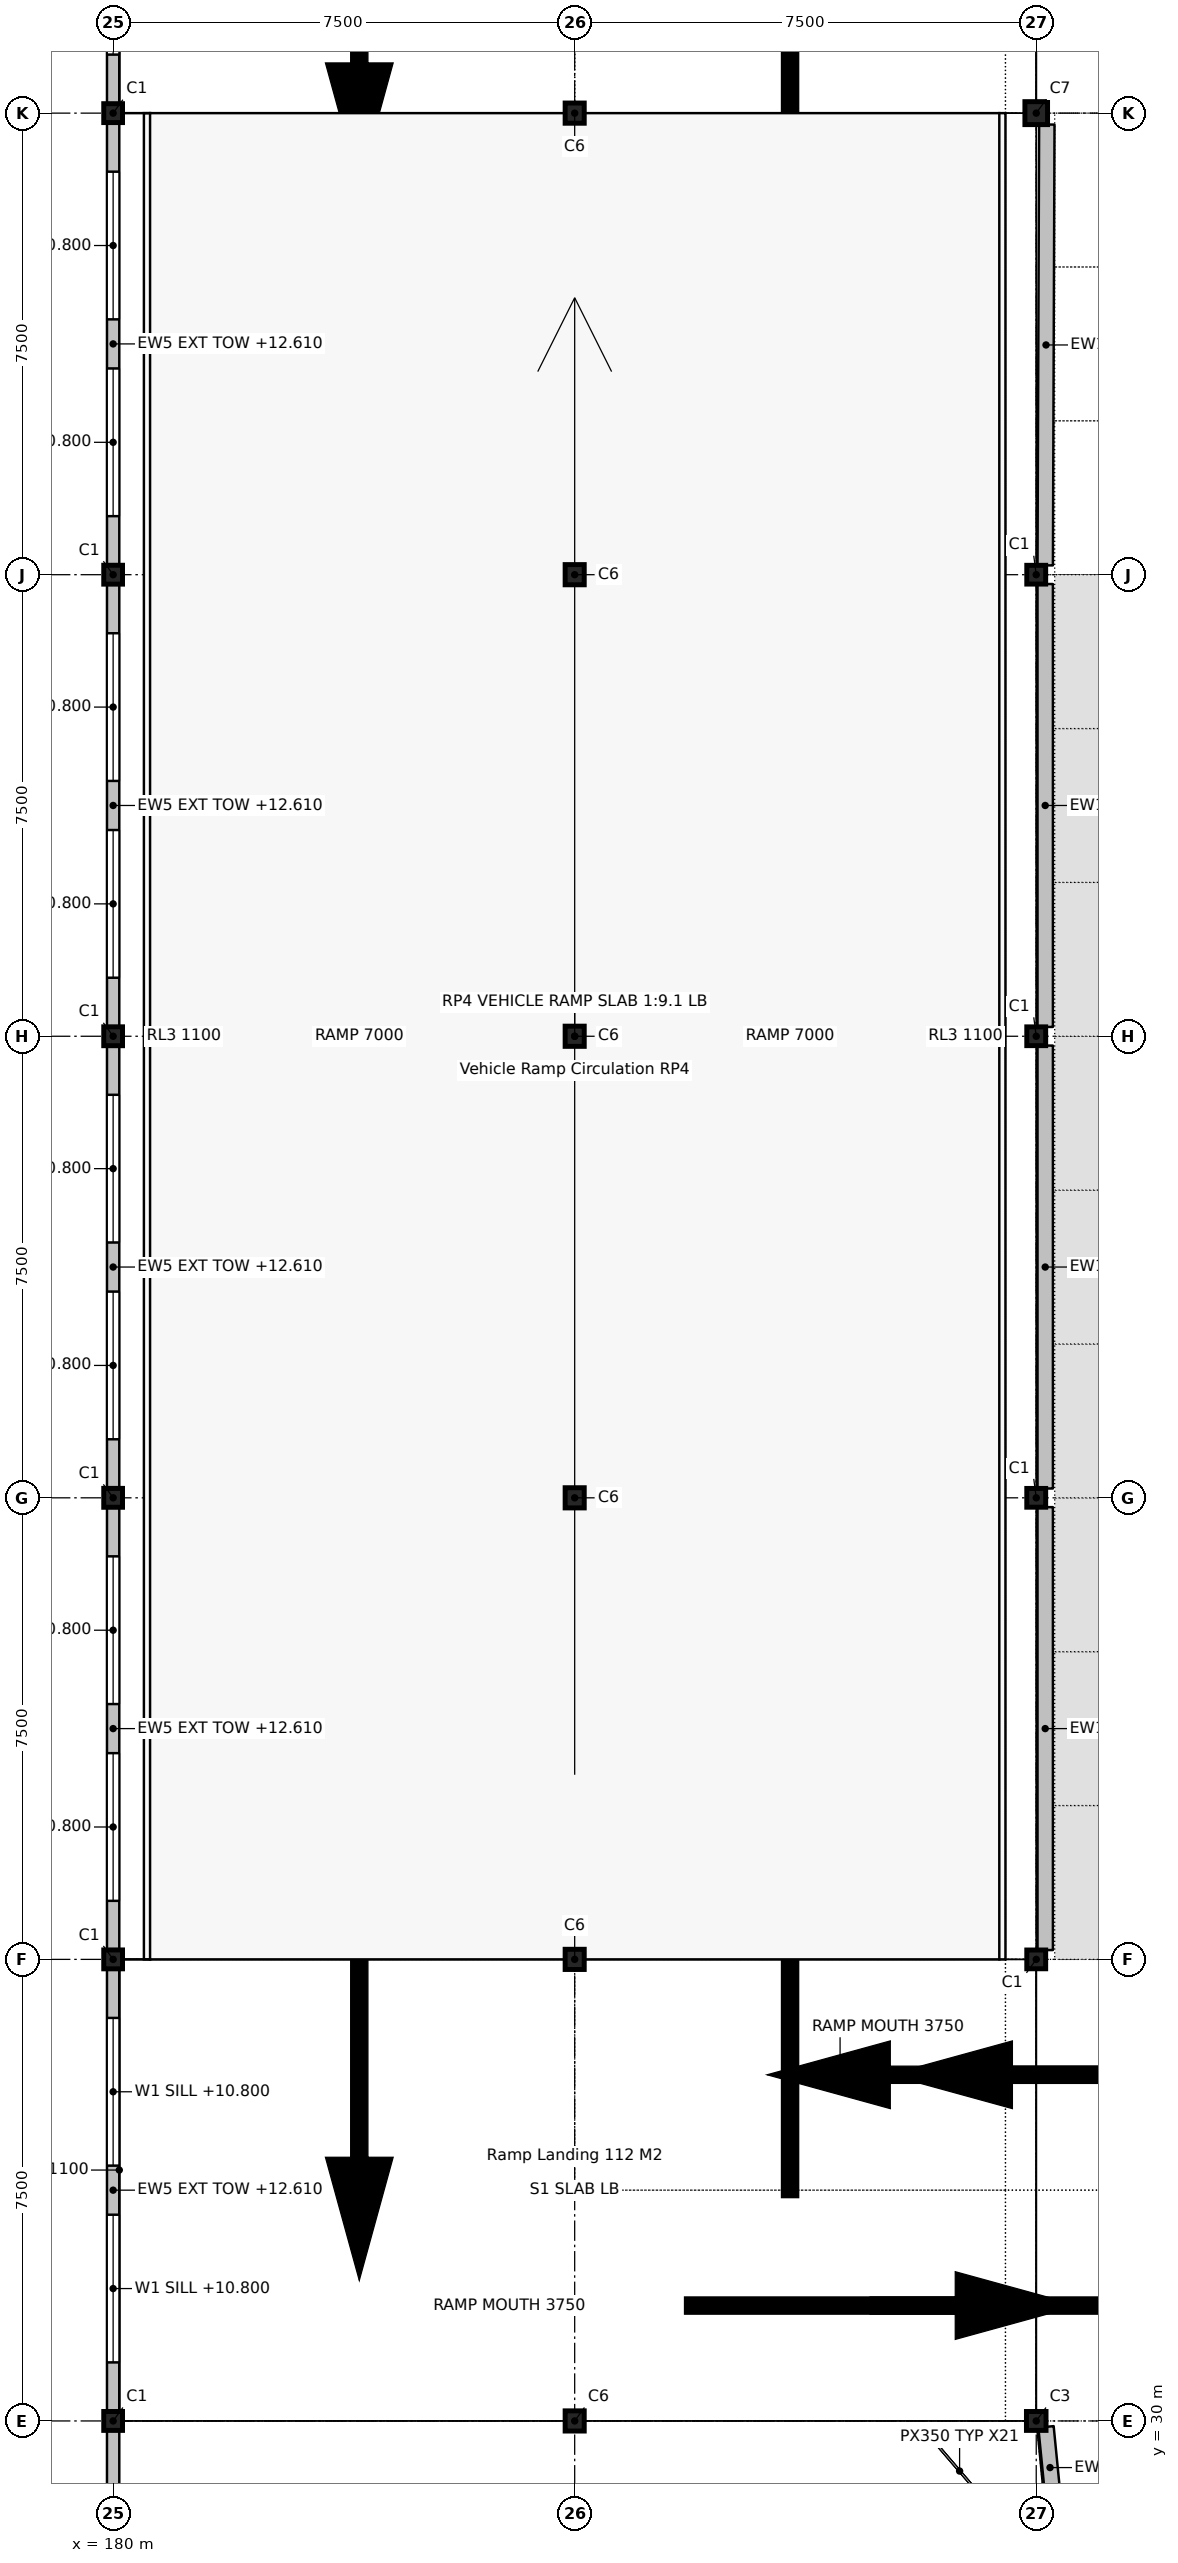
"""IFC4 building model, lengths in metres.
Left out: names, types, materials, properties, quantities, classifications, styles, units other than length and angle.
Written with IfcOpenShell. Run it as: python <this file> out.ifc"""

import sys

from ifc_helpers import new_model, si_unit, direction, frame, frame_2d, origin, origin_2d, place, context, subcontext, project, spatial, rectangle, i_section, extrude, element, fill, save


model = new_model("IFC4")
c1 = context("Model", 3, precision=1e-05, world=origin(), true_north=direction((0.0, 1.0)))
c2 = subcontext(c1, "Body", "Model", "MODEL_VIEW")
j1 = project(units=[si_unit("LENGTHUNIT", "METRE"), si_unit("PLANEANGLEUNIT", "RADIAN")], contexts=[c1])
p1 = place(None, origin())
s1 = spatial("IfcSite", under=j1, at=p1, CompositionType="ELEMENT")
p2 = place(p1, origin())
s2 = spatial("IfcBuilding", under=s1, at=p2, CompositionType="ELEMENT")
p3 = place(p2, frame((0.0, 0.0, 9.9)))
s3 = spatial("IfcBuildingStorey", under=s2, at=p3, CompositionType="ELEMENT", Elevation=9.9)
for number, where, z_axis, x_axis in (
    (1, (180.0, 30.0, 0.0), (0.0, 0.0, 1.0), (1.0, 0.0, 0.0)),
    (2, (180.0, 37.5, 0.0), (0.0, 0.0, 1.0), (1.0, 0.0, 0.0)),
    (3, (180.0, 45.0, 0.0), (0.0, 0.0, 1.0), (1.0, 0.0, 0.0)),
    (4, (180.0, 52.5, 0.0), (0.0, 0.0, 1.0), (1.0, 0.0, 0.0)),
    (5, (180.0, 60.0, 0.0), (0.0, 0.0, 1.0), (1.0, 0.0, 0.0)),
    (6, (180.0, 67.5, 0.0), (0.0, 0.0, 1.0), (1.0, 0.0, 0.0)),
):
    element("IfcColumn", number, at=place(p3, frame(where, z_axis=z_axis, x_axis=x_axis)), inside=s3, PredefinedType="COLUMN", context=c2, shape_type="SweptSolid", body=[
        extrude(i_section(OverallWidth=0.305, OverallDepth=0.307, WebThickness=0.01, FlangeThickness=0.015, FilletRadius=0.015, at=origin_2d()), origin(), (0.0, 0.0, 1.0), 3.3),
    ])
for number, where, z_axis, x_axis in (
    (7, (187.5, 30.0, 0.0), (0.0, 0.0, 1.0), (1.0, 0.0, 0.0)),
    (8, (187.5, 37.5, 0.0), (0.0, 0.0, 1.0), (1.0, 0.0, 0.0)),
    (9, (187.5, 45.0, 0.0), (0.0, 0.0, 1.0), (1.0, 0.0, 0.0)),
    (10, (187.5, 52.5, 0.0), (0.0, 0.0, 1.0), (1.0, 0.0, 0.0)),
    (11, (187.5, 60.0, 0.0), (0.0, 0.0, 1.0), (1.0, 0.0, 0.0)),
    (12, (187.5, 67.5, 0.0), (0.0, 0.0, 1.0), (1.0, 0.0, 0.0)),
):
    element("IfcColumn", number, at=place(p3, frame(where, z_axis=z_axis, x_axis=x_axis)), inside=s3, PredefinedType="COLUMN", context=c2, shape_type="SweptSolid", body=[
        extrude(i_section(OverallWidth=0.31, OverallDepth=0.328, WebThickness=0.015, FlangeThickness=0.025, FilletRadius=0.015, at=origin_2d()), origin(), (0.0, 0.0, 1.0), 3.3),
    ])
p4 = place(p3, frame((195.0, 67.5, 0.0), z_axis=(0.0, 0.0, 1.0), x_axis=(0.0, 1.0, 0.0)))
e13 = element("IfcColumn", 13, at=p4, inside=s3, PredefinedType="COLUMN", context=c2, shape_type="SweptSolid", body=[
    extrude(i_section(OverallWidth=0.373, OverallDepth=0.368, WebThickness=0.015, FlangeThickness=0.024, FilletRadius=0.015, at=origin_2d()), origin(), (0.0, 0.0, 1.0), 3.3),
])
for number, where, z_axis, x_axis in (
    (14, (195.0, 60.0, 0.0), (0.0, 0.0, 1.0), (0.0, 1.0, 0.0)),
    (15, (195.0, 52.5, 0.0), (0.0, 0.0, 1.0), (0.0, 1.0, 0.0)),
    (16, (195.0, 45.0, 0.0), (0.0, 0.0, 1.0), (0.0, 1.0, 0.0)),
    (17, (195.0, 37.5, 0.0), (0.0, 0.0, 1.0), (0.0, 1.0, 0.0)),
):
    element("IfcColumn", number, at=place(p3, frame(where, z_axis=z_axis, x_axis=x_axis)), inside=s3, PredefinedType="COLUMN", context=c2, shape_type="SweptSolid", body=[
        extrude(i_section(OverallWidth=0.305, OverallDepth=0.307, WebThickness=0.01, FlangeThickness=0.015, FilletRadius=0.015, at=origin_2d()), origin(), (0.0, 0.0, 1.0), 3.3),
    ])
p5 = place(p3, frame((195.0, 30.0, 0.0), z_axis=(0.0, 0.0, 1.0), x_axis=(0.0, 1.0, 0.0)))
e18 = element("IfcColumn", 18, at=p5, inside=s3, PredefinedType="COLUMN", context=c2, shape_type="SweptSolid", body=[
    extrude(i_section(OverallWidth=0.307, OverallDepth=0.318, WebThickness=0.013, FlangeThickness=0.021, FilletRadius=0.015, at=origin_2d()), origin(), (0.0, 0.0, 1.0), 3.3),
])
p6 = place(p3, frame((195.172, 67.314, 0.0), z_axis=(0.0, 0.0, 1.0), x_axis=(-0.003681082119, -0.999993224794, 0.0)))
e19 = element("IfcWall", 19, at=p6, inside=s3, PredefinedType="SOLIDWALL", context=c2, shape_type="SweptSolid", body=[
    extrude(rectangle(XDim=7.163, YDim=0.25, at=frame_2d((3.582, 0.0))), origin(), (0.0, 0.0, 1.0), 1.1),
])
for number, where, z_axis, x_axis in (
    (20, (195.146, 59.848, 0.0), (0.0, 0.0, 1.0), (0.0, -1.0, 0.0)),
    (21, (195.146, 52.348, 0.0), (0.0, 0.0, 1.0), (0.0, -1.0, 0.0)),
    (22, (195.146, 44.848, 0.0), (0.0, 0.0, 1.0), (0.0, -1.0, 0.0)),
):
    element("IfcWall", number, at=place(p3, frame(where, z_axis=z_axis, x_axis=x_axis)), inside=s3, PredefinedType="SOLIDWALL", context=c2, shape_type="SweptSolid", body=[
        extrude(rectangle(XDim=7.197, YDim=0.25, at=frame_2d((3.598, 0.0))), origin(), (0.0, 0.0, 1.0), 1.1),
    ])
p7 = place(p3, frame((195.159, 29.904, 0.0), z_axis=(0.0, 0.0, 1.0), x_axis=(0.098067173263, -0.995179797588, 0.0)))
e23 = element("IfcWall", 23, at=p7, inside=s3, PredefinedType="SOLIDWALL", context=c2, shape_type="SweptSolid", body=[
    extrude(rectangle(XDim=1.329, YDim=0.25, at=frame_2d((0.665, 0.0))), origin(), (0.0, 0.0, 1.0), 1.1),
])
p8 = place(p3, frame((180.0, 22.654, 0.0), z_axis=(0.0, 0.0, 1.0), x_axis=(0.0, 1.0, 0.0)))
e24 = element("IfcWall", 24, at=p8, inside=s3, PredefinedType="SOLIDWALL", context=c2, shape_type="SweptSolid", body=[
    extrude(rectangle(XDim=7.193, YDim=0.2, at=frame_2d((3.596, 0.0))), origin(), (0.0, 0.0, 1.0), 2.71),
])
p9 = place(p8, frame((1.098, 0.0, 1.1)))
e25 = element("IfcOpeningElement", 25, at=p9, cuts=e24, PredefinedType="OPENING", context=c2, shape_type="SweptSolid", body=[
    extrude(rectangle(XDim=1.8, YDim=1.4, at=frame_2d((0.9, 0.7))), frame((0.0, 0.11, 0.0), z_axis=(0.0, -1.0, 0.0), x_axis=(1.0, 0.0, 0.0)), (0.0, 0.0, 1.0), 0.22),
])
p10 = place(p8, frame((4.295, 0.0, 1.1)))
e26 = element("IfcOpeningElement", 26, at=p10, cuts=e24, PredefinedType="OPENING", context=c2, shape_type="SweptSolid", body=[
    extrude(rectangle(XDim=1.8, YDim=1.4, at=frame_2d((0.9, 0.7))), frame((0.0, 0.11, 0.0), z_axis=(0.0, -1.0, 0.0), x_axis=(1.0, 0.0, 0.0)), (0.0, 0.0, 1.0), 0.22),
])
p11 = place(p3, frame((180.0, 30.154, 0.0), z_axis=(0.0, 0.0, 1.0), x_axis=(0.0, 1.0, 0.0)))
e27 = element("IfcWall", 27, at=p11, inside=s3, PredefinedType="SOLIDWALL", context=c2, shape_type="SweptSolid", body=[
    extrude(rectangle(XDim=7.193, YDim=0.2, at=frame_2d((3.596, 0.0))), origin(), (0.0, 0.0, 1.0), 2.71),
])
p12 = place(p11, frame((0.798, 0.0, 0.9)))
e28 = element("IfcOpeningElement", 28, at=p12, cuts=e27, PredefinedType="OPENING", context=c2, shape_type="SweptSolid", body=[
    extrude(rectangle(XDim=2.4, YDim=1.5, at=frame_2d((1.2, 0.75))), frame((0.0, 0.11, 0.0), z_axis=(0.0, -1.0, 0.0), x_axis=(1.0, 0.0, 0.0)), (0.0, 0.0, 1.0), 0.22),
])
p13 = place(p11, frame((3.995, 0.0, 0.9)))
e29 = element("IfcOpeningElement", 29, at=p13, cuts=e27, PredefinedType="OPENING", context=c2, shape_type="SweptSolid", body=[
    extrude(rectangle(XDim=2.4, YDim=1.5, at=frame_2d((1.2, 0.75))), frame((0.0, 0.11, 0.0), z_axis=(0.0, -1.0, 0.0), x_axis=(1.0, 0.0, 0.0)), (0.0, 0.0, 1.0), 0.22),
])
p14 = place(p3, frame((180.0, 37.654, 0.0), z_axis=(0.0, 0.0, 1.0), x_axis=(0.0, 1.0, 0.0)))
e30 = element("IfcWall", 30, at=p14, inside=s3, PredefinedType="SOLIDWALL", context=c2, shape_type="SweptSolid", body=[
    extrude(rectangle(XDim=7.193, YDim=0.2, at=frame_2d((3.596, 0.0))), origin(), (0.0, 0.0, 1.0), 2.71),
])
p15 = place(p14, frame((0.798, 0.0, 0.9)))
e31 = element("IfcOpeningElement", 31, at=p15, cuts=e30, PredefinedType="OPENING", context=c2, shape_type="SweptSolid", body=[
    extrude(rectangle(XDim=2.4, YDim=1.5, at=frame_2d((1.2, 0.75))), frame((0.0, 0.11, 0.0), z_axis=(0.0, -1.0, 0.0), x_axis=(1.0, 0.0, 0.0)), (0.0, 0.0, 1.0), 0.22),
])
p16 = place(p14, frame((3.995, 0.0, 0.9)))
e32 = element("IfcOpeningElement", 32, at=p16, cuts=e30, PredefinedType="OPENING", context=c2, shape_type="SweptSolid", body=[
    extrude(rectangle(XDim=2.4, YDim=1.5, at=frame_2d((1.2, 0.75))), frame((0.0, 0.11, 0.0), z_axis=(0.0, -1.0, 0.0), x_axis=(1.0, 0.0, 0.0)), (0.0, 0.0, 1.0), 0.22),
])
p17 = place(p3, frame((180.0, 45.154, 0.0), z_axis=(0.0, 0.0, 1.0), x_axis=(0.0, 1.0, 0.0)))
e33 = element("IfcWall", 33, at=p17, inside=s3, PredefinedType="SOLIDWALL", context=c2, shape_type="SweptSolid", body=[
    extrude(rectangle(XDim=7.193, YDim=0.2, at=frame_2d((3.596, 0.0))), origin(), (0.0, 0.0, 1.0), 2.71),
])
p18 = place(p17, frame((0.798, 0.0, 0.9)))
e34 = element("IfcOpeningElement", 34, at=p18, cuts=e33, PredefinedType="OPENING", context=c2, shape_type="SweptSolid", body=[
    extrude(rectangle(XDim=2.4, YDim=1.5, at=frame_2d((1.2, 0.75))), frame((0.0, 0.11, 0.0), z_axis=(0.0, -1.0, 0.0), x_axis=(1.0, 0.0, 0.0)), (0.0, 0.0, 1.0), 0.22),
])
p19 = place(p17, frame((3.995, 0.0, 0.9)))
e35 = element("IfcOpeningElement", 35, at=p19, cuts=e33, PredefinedType="OPENING", context=c2, shape_type="SweptSolid", body=[
    extrude(rectangle(XDim=2.4, YDim=1.5, at=frame_2d((1.2, 0.75))), frame((0.0, 0.11, 0.0), z_axis=(0.0, -1.0, 0.0), x_axis=(1.0, 0.0, 0.0)), (0.0, 0.0, 1.0), 0.22),
])
p20 = place(p3, frame((180.0, 52.654, 0.0), z_axis=(0.0, 0.0, 1.0), x_axis=(0.0, 1.0, 0.0)))
e36 = element("IfcWall", 36, at=p20, inside=s3, PredefinedType="SOLIDWALL", context=c2, shape_type="SweptSolid", body=[
    extrude(rectangle(XDim=7.193, YDim=0.2, at=frame_2d((3.596, 0.0))), origin(), (0.0, 0.0, 1.0), 2.71),
])
p21 = place(p20, frame((0.798, 0.0, 0.9)))
e37 = element("IfcOpeningElement", 37, at=p21, cuts=e36, PredefinedType="OPENING", context=c2, shape_type="SweptSolid", body=[
    extrude(rectangle(XDim=2.4, YDim=1.5, at=frame_2d((1.2, 0.75))), frame((0.0, 0.11, 0.0), z_axis=(0.0, -1.0, 0.0), x_axis=(1.0, 0.0, 0.0)), (0.0, 0.0, 1.0), 0.22),
])
p22 = place(p20, frame((3.995, 0.0, 0.9)))
e38 = element("IfcOpeningElement", 38, at=p22, cuts=e36, PredefinedType="OPENING", context=c2, shape_type="SweptSolid", body=[
    extrude(rectangle(XDim=2.4, YDim=1.5, at=frame_2d((1.2, 0.75))), frame((0.0, 0.11, 0.0), z_axis=(0.0, -1.0, 0.0), x_axis=(1.0, 0.0, 0.0)), (0.0, 0.0, 1.0), 0.22),
])
p23 = place(p3, frame((180.0, 60.154, 0.0), z_axis=(0.0, 0.0, 1.0), x_axis=(0.0, 1.0, 0.0)))
e39 = element("IfcWall", 39, at=p23, inside=s3, PredefinedType="SOLIDWALL", context=c2, shape_type="SweptSolid", body=[
    extrude(rectangle(XDim=7.193, YDim=0.2, at=frame_2d((3.596, 0.0))), origin(), (0.0, 0.0, 1.0), 2.71),
])
p24 = place(p23, frame((0.798, 0.0, 0.9)))
e40 = element("IfcOpeningElement", 40, at=p24, cuts=e39, PredefinedType="OPENING", context=c2, shape_type="SweptSolid", body=[
    extrude(rectangle(XDim=2.4, YDim=1.5, at=frame_2d((1.2, 0.75))), frame((0.0, 0.11, 0.0), z_axis=(0.0, -1.0, 0.0), x_axis=(1.0, 0.0, 0.0)), (0.0, 0.0, 1.0), 0.22),
])
p25 = place(p23, frame((3.995, 0.0, 0.9)))
e41 = element("IfcOpeningElement", 41, at=p25, cuts=e39, PredefinedType="OPENING", context=c2, shape_type="SweptSolid", body=[
    extrude(rectangle(XDim=2.4, YDim=1.5, at=frame_2d((1.2, 0.75))), frame((0.0, 0.11, 0.0), z_axis=(0.0, -1.0, 0.0), x_axis=(1.0, 0.0, 0.0)), (0.0, 0.0, 1.0), 0.22),
])
p26 = place(p3, frame((180.0, 67.654, 0.0), z_axis=(0.0, 0.0, 1.0), x_axis=(0.0, 1.0, 0.0)))
e42 = element("IfcWall", 42, at=p26, inside=s3, PredefinedType="SOLIDWALL", context=c2, shape_type="SweptSolid", body=[
    extrude(rectangle(XDim=7.193, YDim=0.2, at=frame_2d((3.596, 0.0))), origin(), (0.0, 0.0, 1.0), 2.754),
])
p27 = place(p26, frame((0.798, 0.0, 0.9)))
e43 = element("IfcOpeningElement", 43, at=p27, cuts=e42, PredefinedType="OPENING", context=c2, shape_type="SweptSolid", body=[
    extrude(rectangle(XDim=2.4, YDim=1.5, at=frame_2d((1.2, 0.75))), frame((0.0, 0.11, 0.0), z_axis=(0.0, -1.0, 0.0), x_axis=(1.0, 0.0, 0.0)), (0.0, 0.0, 1.0), 0.22),
])
p28 = place(p26, frame((3.995, 0.0, 0.9)))
e44 = element("IfcOpeningElement", 44, at=p28, cuts=e42, PredefinedType="OPENING", context=c2, shape_type="SweptSolid", body=[
    extrude(rectangle(XDim=2.4, YDim=1.5, at=frame_2d((1.2, 0.75))), frame((0.0, 0.11, 0.0), z_axis=(0.0, -1.0, 0.0), x_axis=(1.0, 0.0, 0.0)), (0.0, 0.0, 1.0), 0.22),
])
p29 = place(p12, origin())
e45 = element("IfcWindow", 45, at=p29, inside=s3, PartitioningType="DOUBLE_PANEL_VERTICAL", PredefinedType="WINDOW", context=c2, shape_type="SweptSolid", body=[
    extrude(rectangle(XDim=2.4, YDim=1.5, at=frame_2d((1.2, 0.75))), frame((0.0, 0.03, 0.0), z_axis=(0.0, -1.0, 0.0), x_axis=(1.0, 0.0, 0.0)), (0.0, 0.0, 1.0), 0.06),
])
fill(e28, e45)
p30 = place(p13, origin())
e46 = element("IfcWindow", 46, at=p30, inside=s3, PartitioningType="DOUBLE_PANEL_VERTICAL", PredefinedType="WINDOW", context=c2, shape_type="SweptSolid", body=[
    extrude(rectangle(XDim=2.4, YDim=1.5, at=frame_2d((1.2, 0.75))), frame((0.0, 0.03, 0.0), z_axis=(0.0, -1.0, 0.0), x_axis=(1.0, 0.0, 0.0)), (0.0, 0.0, 1.0), 0.06),
])
fill(e29, e46)
p31 = place(p15, origin())
e47 = element("IfcWindow", 47, at=p31, inside=s3, PartitioningType="DOUBLE_PANEL_VERTICAL", PredefinedType="WINDOW", context=c2, shape_type="SweptSolid", body=[
    extrude(rectangle(XDim=2.4, YDim=1.5, at=frame_2d((1.2, 0.75))), frame((0.0, 0.03, 0.0), z_axis=(0.0, -1.0, 0.0), x_axis=(1.0, 0.0, 0.0)), (0.0, 0.0, 1.0), 0.06),
])
fill(e31, e47)
p32 = place(p16, origin())
e48 = element("IfcWindow", 48, at=p32, inside=s3, PartitioningType="DOUBLE_PANEL_VERTICAL", PredefinedType="WINDOW", context=c2, shape_type="SweptSolid", body=[
    extrude(rectangle(XDim=2.4, YDim=1.5, at=frame_2d((1.2, 0.75))), frame((0.0, 0.03, 0.0), z_axis=(0.0, -1.0, 0.0), x_axis=(1.0, 0.0, 0.0)), (0.0, 0.0, 1.0), 0.06),
])
fill(e32, e48)
p33 = place(p18, origin())
e49 = element("IfcWindow", 49, at=p33, inside=s3, PartitioningType="DOUBLE_PANEL_VERTICAL", PredefinedType="WINDOW", context=c2, shape_type="SweptSolid", body=[
    extrude(rectangle(XDim=2.4, YDim=1.5, at=frame_2d((1.2, 0.75))), frame((0.0, 0.03, 0.0), z_axis=(0.0, -1.0, 0.0), x_axis=(1.0, 0.0, 0.0)), (0.0, 0.0, 1.0), 0.06),
])
fill(e34, e49)
p34 = place(p19, origin())
e50 = element("IfcWindow", 50, at=p34, inside=s3, PartitioningType="DOUBLE_PANEL_VERTICAL", PredefinedType="WINDOW", context=c2, shape_type="SweptSolid", body=[
    extrude(rectangle(XDim=2.4, YDim=1.5, at=frame_2d((1.2, 0.75))), frame((0.0, 0.03, 0.0), z_axis=(0.0, -1.0, 0.0), x_axis=(1.0, 0.0, 0.0)), (0.0, 0.0, 1.0), 0.06),
])
fill(e35, e50)
p35 = place(p21, origin())
e51 = element("IfcWindow", 51, at=p35, inside=s3, PartitioningType="DOUBLE_PANEL_VERTICAL", PredefinedType="WINDOW", context=c2, shape_type="SweptSolid", body=[
    extrude(rectangle(XDim=2.4, YDim=1.5, at=frame_2d((1.2, 0.75))), frame((0.0, 0.03, 0.0), z_axis=(0.0, -1.0, 0.0), x_axis=(1.0, 0.0, 0.0)), (0.0, 0.0, 1.0), 0.06),
])
fill(e37, e51)
p36 = place(p22, origin())
e52 = element("IfcWindow", 52, at=p36, inside=s3, PartitioningType="DOUBLE_PANEL_VERTICAL", PredefinedType="WINDOW", context=c2, shape_type="SweptSolid", body=[
    extrude(rectangle(XDim=2.4, YDim=1.5, at=frame_2d((1.2, 0.75))), frame((0.0, 0.03, 0.0), z_axis=(0.0, -1.0, 0.0), x_axis=(1.0, 0.0, 0.0)), (0.0, 0.0, 1.0), 0.06),
])
fill(e38, e52)
p37 = place(p24, origin())
e53 = element("IfcWindow", 53, at=p37, inside=s3, PartitioningType="DOUBLE_PANEL_VERTICAL", PredefinedType="WINDOW", context=c2, shape_type="SweptSolid", body=[
    extrude(rectangle(XDim=2.4, YDim=1.5, at=frame_2d((1.2, 0.75))), frame((0.0, 0.03, 0.0), z_axis=(0.0, -1.0, 0.0), x_axis=(1.0, 0.0, 0.0)), (0.0, 0.0, 1.0), 0.06),
])
fill(e40, e53)
p38 = place(p25, origin())
e54 = element("IfcWindow", 54, at=p38, inside=s3, PartitioningType="DOUBLE_PANEL_VERTICAL", PredefinedType="WINDOW", context=c2, shape_type="SweptSolid", body=[
    extrude(rectangle(XDim=2.4, YDim=1.5, at=frame_2d((1.2, 0.75))), frame((0.0, 0.03, 0.0), z_axis=(0.0, -1.0, 0.0), x_axis=(1.0, 0.0, 0.0)), (0.0, 0.0, 1.0), 0.06),
])
fill(e41, e54)
p39 = place(p27, origin())
e55 = element("IfcWindow", 55, at=p39, inside=s3, PartitioningType="DOUBLE_PANEL_VERTICAL", PredefinedType="WINDOW", context=c2, shape_type="SweptSolid", body=[
    extrude(rectangle(XDim=2.4, YDim=1.5, at=frame_2d((1.2, 0.75))), frame((0.0, 0.03, 0.0), z_axis=(0.0, -1.0, 0.0), x_axis=(1.0, 0.0, 0.0)), (0.0, 0.0, 1.0), 0.06),
])
fill(e43, e55)
save(model, sys.argv[1])
